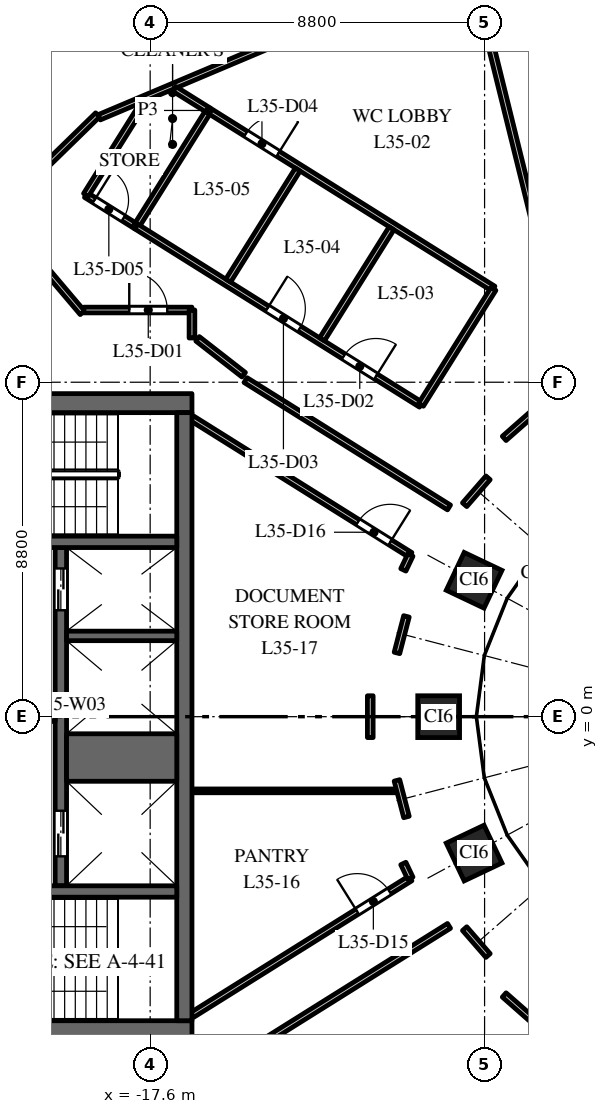
"""IFC4 building model, lengths in metres.
Left out: names, types, materials, properties, quantities, classifications, styles, units other than length and angle.
Written with IfcOpenShell. Run it as: python <this file> out.ifc"""

import sys

from ifc_helpers import new_model, si_unit, direction, frame, frame_2d, origin, origin_2d, place, context, subcontext, project, spatial, rectangle, extrude, element, fill, save


model = new_model("IFC4")
c1 = context("Model", 3, precision=1e-05, world=origin(), true_north=direction((0.0, 1.0)))
c2 = subcontext(c1, "Body", "Model", "MODEL_VIEW")
j1 = project(units=[si_unit("LENGTHUNIT", "METRE"), si_unit("PLANEANGLEUNIT", "RADIAN")], contexts=[c1])
p1 = place(None, origin())
s1 = spatial("IfcSite", under=j1, at=p1, CompositionType="ELEMENT")
p2 = place(p1, origin())
s2 = spatial("IfcBuilding", under=s1, at=p2, CompositionType="ELEMENT")
p3 = place(p2, frame((0.0, 0.0, 154.0)))
s3 = spatial("IfcBuildingStorey", under=s2, at=p3, CompositionType="ELEMENT", Elevation=154.0)
for number, where, z_axis, x_axis in (
    (1, (-9.076, 3.588, 0.0), (0.0, 0.0, 1.0), (-0.429, -0.903, 0.0)),
    (2, (-10.008, 0.0, 0.0), (0.0, 0.0, 1.0), (0.0, -1.0, 0.0)),
    (3, (-9.076, -3.588, 0.0), (0.0, 0.0, 1.0), (0.429, -0.903, 0.0)),
):
    element("IfcColumn", number, at=place(p3, frame(where, z_axis=z_axis, x_axis=x_axis)), inside=s3, PredefinedType="COLUMN", context=c2, shape_type="SweptSolid", body=[
        extrude(rectangle(XDim=1.1, YDim=1.1, at=origin_2d()), origin(), (0.0, 0.0, 1.0), 4.0),
    ])
p4 = place(p3, frame((-16.5, 8.25, 0.0), z_axis=(0.0, 0.0, 1.0), x_axis=(-1.0, 0.0, 0.0)))
e4 = element("IfcWall", 4, at=p4, inside=s3, PredefinedType="SHEAR", context=c2, shape_type="SweptSolid", body=[
    extrude(rectangle(XDim=15.0, YDim=0.5, at=frame_2d((7.5, 0.0))), origin(), (0.0, 0.0, 1.0), 3.7),
])
p5 = place(p4, frame((6.9, 0.0, 0.0)))
e5 = element("IfcOpeningElement", 5, at=p5, cuts=e4, PredefinedType="OPENING", context=c2, shape_type="SweptSolid", body=[
    extrude(rectangle(XDim=1.2, YDim=2.1, at=frame_2d((0.6, 1.05))), frame((0.0, 0.26, 0.0), z_axis=(0.0, -1.0, 0.0), x_axis=(1.0, 0.0, 0.0)), (0.0, 0.0, 1.0), 0.52),
])
p6 = place(p4, frame((12.05, 0.0, 0.0)))
e6 = element("IfcOpeningElement", 6, at=p6, cuts=e4, PredefinedType="OPENING", context=c2, shape_type="SweptSolid", body=[
    extrude(rectangle(XDim=0.9, YDim=2.1, at=frame_2d((0.45, 1.05))), frame((0.0, 0.26, 0.0), z_axis=(0.0, -1.0, 0.0), x_axis=(1.0, 0.0, 0.0)), (0.0, 0.0, 1.0), 0.52),
])
p7 = place(p3, frame((-16.5, -8.25, 0.0), z_axis=(0.0, 0.0, 1.0), x_axis=(-1.0, 0.0, 0.0)))
e7 = element("IfcWall", 7, at=p7, inside=s3, PredefinedType="SHEAR", context=c2, shape_type="SweptSolid", body=[
    extrude(rectangle(XDim=15.0, YDim=0.5, at=frame_2d((7.5, 0.0))), origin(), (0.0, 0.0, 1.0), 3.7),
])
p8 = place(p7, frame((6.9, 0.0, 0.0)))
e8 = element("IfcOpeningElement", 8, at=p8, cuts=e7, PredefinedType="OPENING", context=c2, shape_type="SweptSolid", body=[
    extrude(rectangle(XDim=1.2, YDim=2.1, at=frame_2d((0.6, 1.05))), frame((0.0, 0.26, 0.0), z_axis=(0.0, -1.0, 0.0), x_axis=(1.0, 0.0, 0.0)), (0.0, 0.0, 1.0), 0.52),
])
p9 = place(p7, frame((12.05, 0.0, 0.0)))
e9 = element("IfcOpeningElement", 9, at=p9, cuts=e7, PredefinedType="OPENING", context=c2, shape_type="SweptSolid", body=[
    extrude(rectangle(XDim=0.9, YDim=2.1, at=frame_2d((0.45, 1.05))), frame((0.0, 0.26, 0.0), z_axis=(0.0, -1.0, 0.0), x_axis=(1.0, 0.0, 0.0)), (0.0, 0.0, 1.0), 0.52),
])
p10 = place(p3, frame((-19.95, -4.45, 0.0), z_axis=(0.0, 0.0, 1.0), x_axis=(0.0, 1.0, 0.0)))
e10 = element("IfcWall", 10, at=p10, inside=s3, PredefinedType="SHEAR", context=c2, shape_type="SweptSolid", body=[
    extrude(rectangle(XDim=8.9, YDim=0.3, at=frame_2d((4.45, 0.0))), origin(), (0.0, 0.0, 1.0), 3.7),
])
p11 = place(p10, frame((0.775, 0.0, 0.0)))
e11 = element("IfcOpeningElement", 11, at=p11, cuts=e10, PredefinedType="OPENING", context=c2, shape_type="SweptSolid", body=[
    extrude(rectangle(XDim=1.2, YDim=2.1, at=frame_2d((0.6, 1.05))), frame((0.0, 0.16, 0.0), z_axis=(0.0, -1.0, 0.0), x_axis=(1.0, 0.0, 0.0)), (0.0, 0.0, 1.0), 0.32),
])
p12 = place(p10, frame((7.25, 0.0, 0.0)))
e12 = element("IfcOpeningElement", 12, at=p12, cuts=e10, PredefinedType="OPENING", context=c2, shape_type="SweptSolid", body=[
    extrude(rectangle(XDim=1.1, YDim=2.1, at=frame_2d((0.55, 1.05))), frame((0.0, 0.16, 0.0), z_axis=(0.0, -1.0, 0.0), x_axis=(1.0, 0.0, 0.0)), (0.0, 0.0, 1.0), 0.32),
])
p13 = place(p3, frame((-20.1, 0.0, 0.0), z_axis=(0.0, 0.0, 1.0), x_axis=(-1.0, 0.0, 0.0)))
e13 = element("IfcWall", 13, at=p13, inside=s3, PredefinedType="SHEAR", context=c2, shape_type="SweptSolid", body=[
    extrude(rectangle(XDim=3.28, YDim=0.25, at=frame_2d((1.64, 0.0))), origin(), (0.0, 0.0, 1.0), 3.7),
])
p14 = place(p3, frame((-16.7, -8.0, 0.0), z_axis=(0.0, 0.0, 1.0), x_axis=(0.0, 1.0, 0.0)))
e14 = element("IfcWall", 14, at=p14, inside=s3, PredefinedType="SHEAR", context=c2, shape_type="SweptSolid", body=[
    extrude(rectangle(XDim=16.0, YDim=0.4, at=frame_2d((8.0, 0.0))), origin(), (0.0, 0.0, 1.0), 3.7),
])
p15 = place(p3, frame((-16.9, -1.075, 0.0), z_axis=(0.0, 0.0, 1.0), x_axis=(-1.0, 0.0, 0.0)))
e15 = element("IfcWall", 15, at=p15, inside=s3, PredefinedType="SHEAR", context=c2, shape_type="SweptSolid", body=[
    extrude(rectangle(XDim=2.9, YDim=1.25, at=frame_2d((1.45, 0.0))), origin(), (0.0, 0.0, 1.0), 3.7),
])
p16 = place(p3, frame((-16.9, 2.125, 0.0), z_axis=(0.0, 0.0, 1.0), x_axis=(-1.0, 0.0, 0.0)))
e16 = element("IfcWall", 16, at=p16, inside=s3, PredefinedType="SHEAR", context=c2, shape_type="SweptSolid", body=[
    extrude(rectangle(XDim=2.9, YDim=0.25, at=frame_2d((1.45, 0.0))), origin(), (0.0, 0.0, 1.0), 3.7),
])
p17 = place(p3, frame((-16.9, 4.6, 0.0), z_axis=(0.0, 0.0, 1.0), x_axis=(-1.0, 0.0, 0.0)))
e17 = element("IfcWall", 17, at=p17, inside=s3, PredefinedType="SHEAR", context=c2, shape_type="SweptSolid", body=[
    extrude(rectangle(XDim=6.18, YDim=0.3, at=frame_2d((3.09, 0.0))), origin(), (0.0, 0.0, 1.0), 3.7),
])
p18 = place(p17, frame((4.9, 0.0, 0.0)))
e18 = element("IfcOpeningElement", 18, at=p18, cuts=e17, PredefinedType="OPENING", context=c2, shape_type="SweptSolid", body=[
    extrude(rectangle(XDim=1.1, YDim=2.1, at=frame_2d((0.55, 1.05))), frame((0.0, 0.16, 0.0), z_axis=(0.0, -1.0, 0.0), x_axis=(1.0, 0.0, 0.0)), (0.0, 0.0, 1.0), 0.32),
])
p19 = place(p3, frame((-16.9, -4.6, 0.0), z_axis=(0.0, 0.0, 1.0), x_axis=(-1.0, 0.0, 0.0)))
e19 = element("IfcWall", 19, at=p19, inside=s3, PredefinedType="SHEAR", context=c2, shape_type="SweptSolid", body=[
    extrude(rectangle(XDim=6.18, YDim=0.3, at=frame_2d((3.09, 0.0))), origin(), (0.0, 0.0, 1.0), 3.7),
])
p20 = place(p19, frame((4.9, 0.0, 0.0)))
e20 = element("IfcOpeningElement", 20, at=p20, cuts=e19, PredefinedType="OPENING", context=c2, shape_type="SweptSolid", body=[
    extrude(rectangle(XDim=1.1, YDim=2.1, at=frame_2d((0.55, 1.05))), frame((0.0, 0.16, 0.0), z_axis=(0.0, -1.0, 0.0), x_axis=(1.0, 0.0, 0.0)), (0.0, 0.0, 1.0), 0.32),
])
p21 = place(p3, frame((-24.166, 10.778, 0.0), z_axis=(0.0, 0.0, 1.0), x_axis=(0.715834142481, 0.698270349119, 0.0)))
e21 = element("IfcWall", 21, at=p21, inside=s3, PredefinedType="PARTITIONING", context=c2, shape_type="SweptSolid", body=[
    extrude(rectangle(XDim=7.242, YDim=0.15, at=frame_2d((3.621, 0.0))), origin(), (0.0, 0.0, 1.0), 2.75),
])
p22 = place(p3, frame((-21.568, 13.207, 0.0), z_axis=(0.0, 0.0, 1.0), x_axis=(0.646414818584, -0.762986161287, 0.0)))
e22 = element("IfcWall", 22, at=p22, inside=s3, PredefinedType="PARTITIONING", context=c2, shape_type="SweptSolid", body=[
    extrude(rectangle(XDim=3.38, YDim=0.15, at=frame_2d((1.69, 0.0))), origin(), (0.0, 0.0, 1.0), 3.7),
])
p23 = place(p3, frame((-19.347, 10.7, 0.0), z_axis=(0.0, 0.0, 1.0), x_axis=(1.0, 0.0, 0.0)))
e23 = element("IfcWall", 23, at=p23, inside=s3, PredefinedType="PARTITIONING", context=c2, shape_type="SweptSolid", body=[
    extrude(rectangle(XDim=2.847, YDim=0.15, at=frame_2d((1.423, 0.0))), origin(), (0.0, 0.0, 1.0), 3.7),
])
p24 = place(p23, frame((1.197, 0.0, 0.0)))
e24 = element("IfcOpeningElement", 24, at=p24, cuts=e23, PredefinedType="OPENING", context=c2, shape_type="SweptSolid", body=[
    extrude(rectangle(XDim=1.0, YDim=2.1, at=frame_2d((0.5, 1.05))), frame((0.0, 0.085, 0.0), z_axis=(0.0, -1.0, 0.0), x_axis=(1.0, 0.0, 0.0)), (0.0, 0.0, 1.0), 0.17),
])
p25 = place(p3, frame((-19.289, 13.727, 0.0), z_axis=(0.0, 0.0, 1.0), x_axis=(0.847461540706, -0.530856795213, 0.0)))
e25 = element("IfcWall", 25, at=p25, inside=s3, PredefinedType="PARTITIONING", context=c2, shape_type="SweptSolid", body=[
    extrude(rectangle(XDim=1.56, YDim=0.15, at=frame_2d((0.78, 0.0))), origin(), (0.0, 0.0, 1.0), 2.75),
])
p26 = place(p25, frame((0.26, 0.0, 0.0)))
e26 = element("IfcOpeningElement", 26, at=p26, cuts=e25, PredefinedType="OPENING", context=c2, shape_type="SweptSolid", body=[
    extrude(rectangle(XDim=0.9, YDim=2.1, at=frame_2d((0.45, 1.05))), frame((0.0, 0.085, 0.0), z_axis=(0.0, -1.0, 0.0), x_axis=(1.0, 0.0, 0.0)), (0.0, 0.0, 1.0), 0.17),
])
p27 = place(p3, frame((-19.289, 13.727, 0.0), z_axis=(0.0, 0.0, 1.0), x_axis=(0.530805348015, 0.847493765475, 0.0)))
e27 = element("IfcWall", 27, at=p27, inside=s3, PredefinedType="PARTITIONING", context=c2, shape_type="SweptSolid", body=[
    extrude(rectangle(XDim=2.911, YDim=0.15, at=frame_2d((1.456, 0.0))), origin(), (0.0, 0.0, 1.0), 3.7),
])
p28 = place(p3, frame((-18.94, 15.771, 0.0), z_axis=(0.0, 0.0, 1.0), x_axis=(0.921243869672, 0.3889855172, 0.0)))
e28 = element("IfcWall", 28, at=p28, inside=s3, PredefinedType="PARTITIONING", context=c2, shape_type="SweptSolid", body=[
    extrude(rectangle(XDim=10.589, YDim=0.15, at=frame_2d((5.294, 0.0))), origin(), (0.0, 0.0, 1.0), 2.85),
])
p29 = place(p3, frame((-17.967, 12.899, 0.0), z_axis=(0.0, 0.0, 1.0), x_axis=(0.530723957916, 0.847544736574, 0.0)))
e29 = element("IfcWall", 29, at=p29, inside=s3, PredefinedType="PARTITIONING", context=c2, shape_type="SweptSolid", body=[
    extrude(rectangle(XDim=3.601, YDim=0.15, at=frame_2d((1.801, 0.0))), origin(), (0.0, 0.0, 1.0), 3.7),
])
p30 = place(p3, frame((-17.967, 12.899, 0.0), z_axis=(0.0, 0.0, 1.0), x_axis=(0.847599321369, -0.530636778234, 0.0)))
e30 = element("IfcWall", 30, at=p30, inside=s3, PredefinedType="PARTITIONING", context=c2, shape_type="SweptSolid", body=[
    extrude(rectangle(XDim=8.84, YDim=0.15, at=frame_2d((4.42, 0.0))), origin(), (0.0, 0.0, 1.0), 2.75),
])
p31 = place(p30, frame((6.44, 0.0, 0.0)))
e31 = element("IfcOpeningElement", 31, at=p31, cuts=e30, PredefinedType="OPENING", context=c2, shape_type="SweptSolid", body=[
    extrude(rectangle(XDim=1.0, YDim=2.1, at=frame_2d((0.5, 1.05))), frame((0.0, 0.085, 0.0), z_axis=(0.0, -1.0, 0.0), x_axis=(1.0, 0.0, 0.0)), (0.0, 0.0, 1.0), 0.17),
])
p32 = place(p30, frame((4.071, 0.0, 0.0)))
e32 = element("IfcOpeningElement", 32, at=p32, cuts=e30, PredefinedType="OPENING", context=c2, shape_type="SweptSolid", body=[
    extrude(rectangle(XDim=1.0, YDim=2.1, at=frame_2d((0.5, 1.05))), frame((0.0, 0.085, 0.0), z_axis=(0.0, -1.0, 0.0), x_axis=(1.0, 0.0, 0.0)), (0.0, 0.0, 1.0), 0.17),
])
p33 = place(p3, frame((-16.965, 16.519, 0.0), z_axis=(0.0, 0.0, 1.0), x_axis=(0.848049474304, -0.529917058729, 0.0)))
e33 = element("IfcWall", 33, at=p33, inside=s3, PredefinedType="PARTITIONING", context=c2, shape_type="SweptSolid", body=[
    extrude(rectangle(XDim=1.072, YDim=0.15, at=frame_2d((0.536, 0.0))), origin(), (0.0, 0.0, 1.0), 3.7),
])
p34 = place(p3, frame((-16.5, -1.952, 0.0), z_axis=(0.0, 0.0, 1.0), x_axis=(1.0, 0.0, 0.0)))
e34 = element("IfcWall", 34, at=p34, inside=s3, PredefinedType="PARTITIONING", context=c2, shape_type="SweptSolid", body=[
    extrude(rectangle(XDim=5.384, YDim=0.1, at=frame_2d((2.692, 0.0))), origin(), (0.0, 0.0, 1.0), 3.7),
])
p35 = place(p3, frame((-16.5, 9.964, 0.0), z_axis=(0.0, 0.0, 1.0), x_axis=(0.0, 1.0, 0.0)))
e35 = element("IfcWall", 35, at=p35, inside=s3, PredefinedType="PARTITIONING", context=c2, shape_type="SweptSolid", body=[
    extrude(rectangle(XDim=0.736, YDim=0.15, at=frame_2d((0.368, 0.0))), origin(), (0.0, 0.0, 1.0), 3.7),
])
p36 = place(p3, frame((-16.057, 15.95, 0.0), z_axis=(0.0, 0.0, 1.0), x_axis=(0.847655082048, -0.530547699908, 0.0)))
e36 = element("IfcWall", 36, at=p36, inside=s3, PredefinedType="PARTITIONING", context=c2, shape_type="SweptSolid", body=[
    extrude(rectangle(XDim=8.836, YDim=0.15, at=frame_2d((4.418, 0.0))), origin(), (0.0, 0.0, 1.0), 2.85),
])
p37 = place(p36, frame((1.15, 0.0, 0.0)))
e37 = element("IfcOpeningElement", 37, at=p37, cuts=e36, PredefinedType="OPENING", context=c2, shape_type="SweptSolid", body=[
    extrude(rectangle(XDim=1.0, YDim=2.1, at=frame_2d((0.5, 1.05))), frame((0.0, 0.085, 0.0), z_axis=(0.0, -1.0, 0.0), x_axis=(1.0, 0.0, 0.0)), (0.0, 0.0, 1.0), 0.17),
])
p38 = place(p3, frame((-16.5, -7.851, 0.0), z_axis=(0.0, 0.0, 1.0), x_axis=(0.847690706888, 0.530490777917, 0.0)))
e38 = element("IfcWall", 38, at=p38, inside=s3, PredefinedType="PARTITIONING", context=c2, shape_type="SweptSolid", body=[
    extrude(rectangle(XDim=6.781, YDim=0.15, at=frame_2d((3.39, 0.0))), origin(), (0.0, 0.0, 1.0), 3.7),
])
p39 = place(p38, frame((5.131, 0.0, 0.0)))
e39 = element("IfcOpeningElement", 39, at=p39, cuts=e38, PredefinedType="OPENING", context=c2, shape_type="SweptSolid", body=[
    extrude(rectangle(XDim=1.0, YDim=2.1, at=frame_2d((0.5, 1.05))), frame((0.0, 0.085, 0.0), z_axis=(0.0, -1.0, 0.0), x_axis=(1.0, 0.0, 0.0)), (0.0, 0.0, 1.0), 0.17),
])
p40 = place(p3, frame((-16.5, 7.851, 0.0), z_axis=(0.0, 0.0, 1.0), x_axis=(0.847690706888, -0.530490777917, 0.0)))
e40 = element("IfcWall", 40, at=p40, inside=s3, PredefinedType="PARTITIONING", context=c2, shape_type="SweptSolid", body=[
    extrude(rectangle(XDim=6.781, YDim=0.15, at=frame_2d((3.39, 0.0))), origin(), (0.0, 0.0, 1.0), 3.7),
])
p41 = place(p40, frame((5.151, 0.0, 0.0)))
e41 = element("IfcOpeningElement", 41, at=p41, cuts=e40, PredefinedType="OPENING", context=c2, shape_type="SweptSolid", body=[
    extrude(rectangle(XDim=1.0, YDim=2.1, at=frame_2d((0.5, 1.05))), frame((0.0, 0.085, 0.0), z_axis=(0.0, -1.0, 0.0), x_axis=(1.0, 0.0, 0.0)), (0.0, 0.0, 1.0), 0.17),
])
p42 = place(p3, frame((-15.547, 11.473, 0.0), z_axis=(0.0, 0.0, 1.0), x_axis=(0.530730236176, 0.847540805158, 0.0)))
e42 = element("IfcWall", 42, at=p42, inside=s3, PredefinedType="PARTITIONING", context=c2, shape_type="SweptSolid", body=[
    extrude(rectangle(XDim=3.45, YDim=0.15, at=frame_2d((1.725, 0.0))), origin(), (0.0, 0.0, 1.0), 3.7),
])
for number, where, z_axis, x_axis in (
    (43, (-15.089, -8.856, 0.0), (0.0, 0.0, 1.0), (0.848, 0.531, 0.0)),
    (44, (-15.089, 8.856, 0.0), (0.0, 0.0, 1.0), (0.848, -0.531, 0.0)),
):
    element("IfcWall", number, at=place(p3, frame(where, z_axis=z_axis, x_axis=x_axis)), inside=s3, PredefinedType="PARTITIONING", context=c2, shape_type="SweptSolid", body=[
        extrude(rectangle(XDim=6.315, YDim=0.15, at=frame_2d((3.158, 0.0))), origin(), (0.0, 0.0, 1.0), 3.7),
    ])
p43 = place(p3, frame((-13.078, 9.928, 0.0), z_axis=(0.0, 0.0, 1.0), x_axis=(0.530603340991, 0.847620253727, 0.0)))
e45 = element("IfcWall", 45, at=p43, inside=s3, PredefinedType="PARTITIONING", context=c2, shape_type="SweptSolid", body=[
    extrude(rectangle(XDim=3.448, YDim=0.15, at=frame_2d((1.724, 0.0))), origin(), (0.0, 0.0, 1.0), 3.7),
])
p44 = place(p3, frame((-12.666, -10.669, 0.0), z_axis=(0.0, 0.0, 1.0), x_axis=(0.925451421732, 0.378866290416, 0.0)))
e46 = element("IfcWall", 46, at=p44, inside=s3, PredefinedType="PARTITIONING", context=c2, shape_type="SweptSolid", body=[
    extrude(rectangle(XDim=6.189, YDim=0.1, at=frame_2d((3.095, 0.0))), origin(), (0.0, 0.0, 1.0), 3.7),
])
p45 = place(p3, frame((-11.808, -0.55, 0.0), z_axis=(0.0, 0.0, 1.0), x_axis=(0.0, 1.0, 0.0)))
e47 = element("IfcWall", 47, at=p45, inside=s3, PredefinedType="PARTITIONING", context=c2, shape_type="SweptSolid", body=[
    extrude(rectangle(XDim=1.1, YDim=0.15, at=frame_2d((0.55, 0.0))), origin(), (0.0, 0.0, 1.0), 3.7),
])
for number, where, z_axis, x_axis in (
    (48, (-11.106, -1.677, 0.0), (0.0, 0.0, 1.0), (0.252, -0.968, 0.0)),
    (49, (-11.106, 1.677, 0.0), (0.0, 0.0, 1.0), (0.252, 0.968, 0.0)),
):
    element("IfcWall", number, at=place(p3, frame(where, z_axis=z_axis, x_axis=x_axis)), inside=s3, PredefinedType="PARTITIONING", context=c2, shape_type="SweptSolid", body=[
        extrude(rectangle(XDim=0.994, YDim=0.15, at=frame_2d((0.497, 0.0))), origin(), (0.0, 0.0, 1.0), 3.7),
    ])
for number, where, z_axis, x_axis in (
    (50, (-10.938, -3.863, 0.0), (0.0, 0.0, 1.0), (0.43, -0.903, 0.0)),
    (51, (-10.938, 3.863, 0.0), (0.0, 0.0, 1.0), (0.43, 0.903, 0.0)),
):
    element("IfcWall", number, at=place(p3, frame(where, z_axis=z_axis, x_axis=x_axis)), inside=s3, PredefinedType="PARTITIONING", context=c2, shape_type="SweptSolid", body=[
        extrude(rectangle(XDim=0.433, YDim=0.15, at=frame_2d((0.216, 0.0))), origin(), (0.0, 0.0, 1.0), 3.7),
    ])
p46 = place(p3, frame((-10.474, 8.208, 0.0), z_axis=(0.0, 0.0, 1.0), x_axis=(0.530627347961, 0.847605225088, 0.0)))
e52 = element("IfcWall", 52, at=p46, inside=s3, PredefinedType="PARTITIONING", context=c2, shape_type="SweptSolid", body=[
    extrude(rectangle(XDim=3.596, YDim=0.15, at=frame_2d((1.798, 0.0))), origin(), (0.0, 0.0, 1.0), 2.85),
])
for number, where, z_axis, x_axis in (
    (53, (-9.325, -5.577, 0.0), (0.0, 0.0, 1.0), (0.656, -0.754, 0.0)),
    (54, (-9.325, 5.577, 0.0), (0.0, 0.0, 1.0), (0.656, 0.754, 0.0)),
):
    element("IfcWall", number, at=place(p3, frame(where, z_axis=z_axis, x_axis=x_axis)), inside=s3, PredefinedType="PARTITIONING", context=c2, shape_type="SweptSolid", body=[
        extrude(rectangle(XDim=0.938, YDim=0.15, at=frame_2d((0.469, 0.0))), origin(), (0.0, 0.0, 1.0), 2.75),
    ])
p47 = place(p3, frame((-9.185, 19.89, 0.0), z_axis=(0.0, 0.0, 1.0), x_axis=(0.239863913553, -0.970806521906, 0.0)))
e55 = element("IfcWall", 55, at=p47, inside=s3, PredefinedType="PARTITIONING", context=c2, shape_type="SweptSolid", body=[
    extrude(rectangle(XDim=11.916, YDim=0.15, at=frame_2d((5.958, 0.0))), origin(), (0.0, 0.0, 1.0), 3.7),
])
p48 = place(p3, frame((-8.284, -7.322, 0.0), z_axis=(0.0, 0.0, 1.0), x_axis=(0.750666784408, -0.660680996235, 0.0)))
e56 = element("IfcWall", 56, at=p48, inside=s3, PredefinedType="PARTITIONING", context=c2, shape_type="SweptSolid", body=[
    extrude(rectangle(XDim=1.555, YDim=0.15, at=frame_2d((0.777, 0.0))), origin(), (0.0, 0.0, 1.0), 3.7),
])
p49 = place(p3, frame((-8.284, 7.322, 0.0), z_axis=(0.0, 0.0, 1.0), x_axis=(0.750605726473, 0.660750363894, 0.0)))
e57 = element("IfcWall", 57, at=p49, inside=s3, PredefinedType="PARTITIONING", context=c2, shape_type="SweptSolid", body=[
    extrude(rectangle(XDim=2.337, YDim=0.15, at=frame_2d((1.168, 0.0))), origin(), (0.0, 0.0, 1.0), 2.85),
])
p50 = place(p3, frame((-16.352, 9.942, 0.0), z_axis=(0.0, 0.0, 1.0), x_axis=(0.788950226826, -0.614457109643, 0.0)))
e58 = element("IfcWall", 58, at=p50, inside=s3, PredefinedType="PARTITIONING", context=c2, shape_type="SweptSolid", body=[
    extrude(rectangle(XDim=1.538, YDim=0.15, at=frame_2d((0.769, 0.0))), origin(), (0.0, 0.0, 1.0), 3.7),
])
p51 = place(p11, origin())
e59 = element("IfcDoor", 59, at=p51, inside=s3, OperationType="DOUBLE_DOOR_SLIDING", PredefinedType="DOOR", context=c2, shape_type="SweptSolid", body=[
    extrude(rectangle(XDim=1.2, YDim=2.1, at=frame_2d((0.6, 1.05))), frame((0.0, 0.025, 0.0), z_axis=(0.0, -1.0, 0.0), x_axis=(1.0, 0.0, 0.0)), (0.0, 0.0, 1.0), 0.05),
])
fill(e11, e59)
p52 = place(p12, origin())
e60 = element("IfcDoor", 60, at=p52, inside=s3, OperationType="DOUBLE_DOOR_SLIDING", PredefinedType="DOOR", context=c2, shape_type="SweptSolid", body=[
    extrude(rectangle(XDim=1.1, YDim=2.1, at=frame_2d((0.55, 1.05))), frame((0.0, 0.025, 0.0), z_axis=(0.0, -1.0, 0.0), x_axis=(1.0, 0.0, 0.0)), (0.0, 0.0, 1.0), 0.05),
])
fill(e12, e60)
p53 = place(p24, origin())
e61 = element("IfcDoor", 61, at=p53, inside=s3, OperationType="SINGLE_SWING_LEFT", PredefinedType="DOOR", context=c2, shape_type="SweptSolid", body=[
    extrude(rectangle(XDim=1.0, YDim=2.1, at=frame_2d((0.5, 1.05))), frame((0.0, 0.025, 0.0), z_axis=(0.0, -1.0, 0.0), x_axis=(1.0, 0.0, 0.0)), (0.0, 0.0, 1.0), 0.05),
])
fill(e24, e61)
p54 = place(p31, origin())
e62 = element("IfcDoor", 62, at=p54, inside=s3, OperationType="SINGLE_SWING_RIGHT", PredefinedType="DOOR", context=c2, shape_type="SweptSolid", body=[
    extrude(rectangle(XDim=1.0, YDim=2.1, at=frame_2d((0.5, 1.05))), frame((0.0, 0.025, 0.0), z_axis=(0.0, -1.0, 0.0), x_axis=(1.0, 0.0, 0.0)), (0.0, 0.0, 1.0), 0.05),
])
fill(e31, e62)
p55 = place(p32, origin())
e63 = element("IfcDoor", 63, at=p55, inside=s3, OperationType="SINGLE_SWING_LEFT", PredefinedType="DOOR", context=c2, shape_type="SweptSolid", body=[
    extrude(rectangle(XDim=1.0, YDim=2.1, at=frame_2d((0.5, 1.05))), frame((0.0, 0.025, 0.0), z_axis=(0.0, -1.0, 0.0), x_axis=(1.0, 0.0, 0.0)), (0.0, 0.0, 1.0), 0.05),
])
fill(e32, e63)
p56 = place(p37, origin())
e64 = element("IfcDoor", 64, at=p56, inside=s3, OperationType="SINGLE_SWING_RIGHT", PredefinedType="DOOR", context=c2, shape_type="SweptSolid", body=[
    extrude(rectangle(XDim=1.0, YDim=2.1, at=frame_2d((0.5, 1.05))), frame((0.0, 0.025, 0.0), z_axis=(0.0, -1.0, 0.0), x_axis=(1.0, 0.0, 0.0)), (0.0, 0.0, 1.0), 0.05),
])
fill(e37, e64)
p57 = place(p26, origin())
e65 = element("IfcDoor", 65, at=p57, inside=s3, OperationType="SINGLE_SWING_LEFT", PredefinedType="DOOR", context=c2, shape_type="SweptSolid", body=[
    extrude(rectangle(XDim=0.9, YDim=2.1, at=frame_2d((0.45, 1.05))), frame((0.0, 0.025, 0.0), z_axis=(0.0, -1.0, 0.0), x_axis=(1.0, 0.0, 0.0)), (0.0, 0.0, 1.0), 0.05),
])
fill(e26, e65)
p58 = place(p39, origin())
e66 = element("IfcDoor", 66, at=p58, inside=s3, OperationType="SINGLE_SWING_LEFT", PredefinedType="DOOR", context=c2, shape_type="SweptSolid", body=[
    extrude(rectangle(XDim=1.0, YDim=2.1, at=frame_2d((0.5, 1.05))), frame((0.0, 0.025, 0.0), z_axis=(0.0, -1.0, 0.0), x_axis=(1.0, 0.0, 0.0)), (0.0, 0.0, 1.0), 0.05),
])
fill(e39, e66)
p59 = place(p41, origin())
e67 = element("IfcDoor", 67, at=p59, inside=s3, OperationType="SINGLE_SWING_RIGHT", PredefinedType="DOOR", context=c2, shape_type="SweptSolid", body=[
    extrude(rectangle(XDim=1.0, YDim=2.1, at=frame_2d((0.5, 1.05))), frame((0.0, 0.025, 0.0), z_axis=(0.0, -1.0, 0.0), x_axis=(1.0, 0.0, 0.0)), (0.0, 0.0, 1.0), 0.05),
])
fill(e41, e67)
save(model, sys.argv[1])
